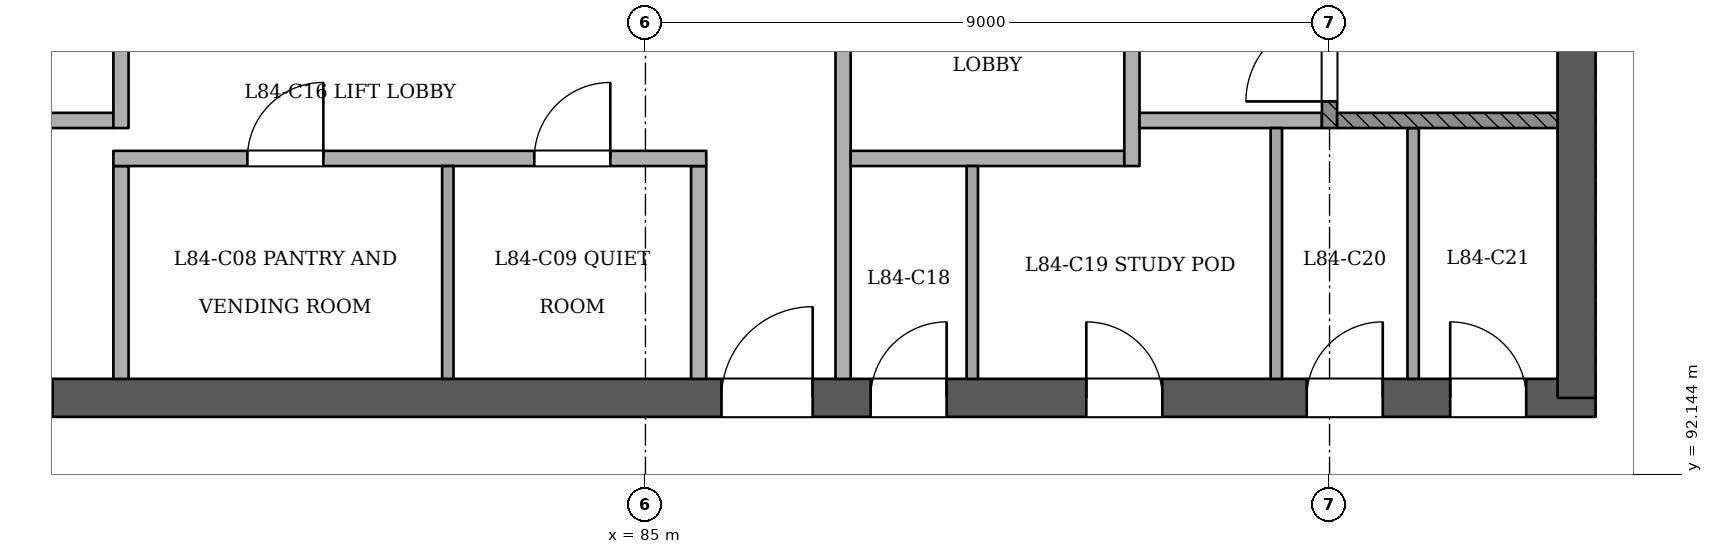
"""IFC4 building model, lengths in metres.
Left out: names, types, materials, properties, quantities, classifications, styles, units other than length and angle.
Written with IfcOpenShell. Run it as: python <this file> out.ifc"""

import sys

from ifc_helpers import new_model, si_unit, direction, frame, frame_2d, origin, place, context, subcontext, project, spatial, rectangle, extrude, element, fill, save


model = new_model("IFC4")
c1 = context("Model", 3, precision=1e-05, world=origin(), true_north=direction((0.0, 1.0)))
c2 = subcontext(c1, "Body", "Model", "MODEL_VIEW")
j1 = project(units=[si_unit("LENGTHUNIT", "METRE"), si_unit("PLANEANGLEUNIT", "RADIAN")], contexts=[c1])
p1 = place(None, origin())
s1 = spatial("IfcSite", under=j1, at=p1, CompositionType="ELEMENT")
p2 = place(p1, origin())
s2 = spatial("IfcBuilding", under=s1, at=p2, CompositionType="ELEMENT")
p3 = place(p2, frame((0.0, 0.0, 323.8)))
s3 = spatial("IfcBuildingStorey", under=s2, at=p3, CompositionType="ELEMENT", Elevation=323.8)
p4 = place(p3, frame((72.75, 93.15, 0.0), z_axis=(0.0, 0.0, 1.0), x_axis=(1.0, 0.0, 0.0)))
e1 = element("IfcWall", 1, at=p4, inside=s3, PredefinedType="SHEAR", context=c2, shape_type="SweptSolid", body=[
    extrude(rectangle(XDim=24.75, YDim=0.5, at=frame_2d((12.375, 0.0))), origin(), (0.0, 0.0, 1.0), 3.6),
])
p5 = place(p4, frame((1.05, 0.0, 0.0)))
e2 = element("IfcOpeningElement", 2, at=p5, cuts=e1, PredefinedType="OPENING", context=c2, shape_type="SweptSolid", body=[
    extrude(rectangle(XDim=1.2, YDim=2.1, at=frame_2d((0.6, 1.05))), frame((0.0, 0.26, 0.0), z_axis=(0.0, -1.0, 0.0), x_axis=(1.0, 0.0, 0.0)), (0.0, 0.0, 1.0), 0.521),
])
p6 = place(p4, frame((3.25, 0.0, 0.0)))
e3 = element("IfcOpeningElement", 3, at=p6, cuts=e1, PredefinedType="OPENING", context=c2, shape_type="SweptSolid", body=[
    extrude(rectangle(XDim=1.2, YDim=2.1, at=frame_2d((0.6, 1.05))), frame((0.0, 0.26, 0.0), z_axis=(0.0, -1.0, 0.0), x_axis=(1.0, 0.0, 0.0)), (0.0, 0.0, 1.0), 0.521),
])
p7 = place(p4, frame((13.25, 0.0, 0.0)))
e4 = element("IfcOpeningElement", 4, at=p7, cuts=e1, PredefinedType="OPENING", context=c2, shape_type="SweptSolid", body=[
    extrude(rectangle(XDim=1.2, YDim=2.1, at=frame_2d((0.6, 1.05))), frame((0.0, 0.26, 0.0), z_axis=(0.0, -1.0, 0.0), x_axis=(1.0, 0.0, 0.0)), (0.0, 0.0, 1.0), 0.521),
])
p8 = place(p4, frame((15.212, 0.0, 0.0)))
e5 = element("IfcOpeningElement", 5, at=p8, cuts=e1, PredefinedType="OPENING", context=c2, shape_type="SweptSolid", body=[
    extrude(rectangle(XDim=1.0, YDim=2.1, at=frame_2d((0.5, 1.05))), frame((0.0, 0.26, 0.0), z_axis=(0.0, -1.0, 0.0), x_axis=(1.0, 0.0, 0.0)), (0.0, 0.0, 1.0), 0.521),
])
p9 = place(p4, frame((18.05, 0.0, 0.0)))
e6 = element("IfcOpeningElement", 6, at=p9, cuts=e1, PredefinedType="OPENING", context=c2, shape_type="SweptSolid", body=[
    extrude(rectangle(XDim=1.0, YDim=2.1, at=frame_2d((0.5, 1.05))), frame((0.0, 0.26, 0.0), z_axis=(0.0, -1.0, 0.0), x_axis=(1.0, 0.0, 0.0)), (0.0, 0.0, 1.0), 0.521),
])
p10 = place(p4, frame((20.95, 0.0, 0.0)))
e7 = element("IfcOpeningElement", 7, at=p10, cuts=e1, PredefinedType="OPENING", context=c2, shape_type="SweptSolid", body=[
    extrude(rectangle(XDim=1.0, YDim=2.1, at=frame_2d((0.5, 1.05))), frame((0.0, 0.26, 0.0), z_axis=(0.0, -1.0, 0.0), x_axis=(1.0, 0.0, 0.0)), (0.0, 0.0, 1.0), 0.521),
])
p11 = place(p4, frame((22.837, 0.0, 0.0)))
e8 = element("IfcOpeningElement", 8, at=p11, cuts=e1, PredefinedType="OPENING", context=c2, shape_type="SweptSolid", body=[
    extrude(rectangle(XDim=1.0, YDim=2.1, at=frame_2d((0.5, 1.05))), frame((0.0, 0.26, 0.0), z_axis=(0.0, -1.0, 0.0), x_axis=(1.0, 0.0, 0.0)), (0.0, 0.0, 1.0), 0.521),
])
p12 = place(p3, frame((97.25, 93.15, 0.0), z_axis=(0.0, 0.0, 1.0), x_axis=(0.0, 1.0, 0.0)))
e9 = element("IfcWall", 9, at=p12, inside=s3, PredefinedType="SHEAR", context=c2, shape_type="SweptSolid", body=[
    extrude(rectangle(XDim=10.75, YDim=0.5, at=frame_2d((5.375, 0.0))), origin(), (0.0, 0.0, 1.0), 3.6),
])
p13 = place(p3, frame((78.1, 93.4, 0.0), z_axis=(0.0, 0.0, 1.0), x_axis=(0.0, 1.0, 0.0)))
e10 = element("IfcWall", 10, at=p13, inside=s3, PredefinedType="PARTITIONING", context=c2, shape_type="SweptSolid", body=[
    extrude(rectangle(XDim=2.8, YDim=0.2, at=frame_2d((1.4, 0.0))), origin(), (0.0, 0.0, 1.0), 3.2),
])
p14 = place(p3, frame((82.4, 93.4, 0.0), z_axis=(0.0, 0.0, 1.0), x_axis=(0.0, 1.0, 0.0)))
e11 = element("IfcWall", 11, at=p14, inside=s3, PredefinedType="PARTITIONING", context=c2, shape_type="SweptSolid", body=[
    extrude(rectangle(XDim=2.8, YDim=0.15, at=frame_2d((1.4, 0.0))), origin(), (0.0, 0.0, 1.0), 3.2),
])
p15 = place(p3, frame((85.7, 93.4, 0.0), z_axis=(0.0, 0.0, 1.0), x_axis=(0.0, 1.0, 0.0)))
e12 = element("IfcWall", 12, at=p15, inside=s3, PredefinedType="PARTITIONING", context=c2, shape_type="SweptSolid", body=[
    extrude(rectangle(XDim=2.8, YDim=0.2, at=frame_2d((1.4, 0.0))), origin(), (0.0, 0.0, 1.0), 3.2),
])
p16 = place(p3, frame((87.6, 93.4, 0.0), z_axis=(0.0, 0.0, 1.0), x_axis=(0.0, 1.0, 0.0)))
e13 = element("IfcWall", 13, at=p16, inside=s3, PredefinedType="PARTITIONING", context=c2, shape_type="SweptSolid", body=[
    extrude(rectangle(XDim=7.0, YDim=0.2, at=frame_2d((3.5, 0.0))), origin(), (0.0, 0.0, 1.0), 3.2),
])
p17 = place(p16, frame((4.45, 0.0, 0.0)))
e14 = element("IfcOpeningElement", 14, at=p17, cuts=e13, PredefinedType="OPENING", context=c2, shape_type="SweptSolid", body=[
    extrude(rectangle(XDim=1.1, YDim=2.1, at=frame_2d((0.55, 1.05))), frame((0.0, 0.11, 0.0), z_axis=(0.0, -1.0, 0.0), x_axis=(1.0, 0.0, 0.0)), (0.0, 0.0, 1.0), 0.221),
])
p18 = place(p3, frame((89.3, 93.4, 0.0), z_axis=(0.0, 0.0, 1.0), x_axis=(0.0, 1.0, 0.0)))
e15 = element("IfcWall", 15, at=p18, inside=s3, PredefinedType="PARTITIONING", context=c2, shape_type="SweptSolid", body=[
    extrude(rectangle(XDim=2.8, YDim=0.15, at=frame_2d((1.4, 0.0))), origin(), (0.0, 0.0, 1.0), 3.2),
])
for number, where, z_axis, x_axis in (
    (16, (93.3, 93.4, 0.0), (0.0, 0.0, 1.0), (0.0, 1.0, 0.0)),
    (17, (95.1, 93.4, 0.0), (0.0, 0.0, 1.0), (0.0, 1.0, 0.0)),
):
    element("IfcWall", number, at=place(p3, frame(where, z_axis=z_axis, x_axis=x_axis)), inside=s3, PredefinedType="PARTITIONING", context=c2, shape_type="SweptSolid", body=[
        extrude(rectangle(XDim=3.3, YDim=0.15, at=frame_2d((1.65, 0.0))), origin(), (0.0, 0.0, 1.0), 3.2),
    ])
p19 = place(p3, frame((78.0, 96.3, 0.0), z_axis=(0.0, 0.0, 1.0), x_axis=(1.0, 0.0, 0.0)))
e18 = element("IfcWall", 18, at=p19, inside=s3, PredefinedType="PARTITIONING", context=c2, shape_type="SweptSolid", body=[
    extrude(rectangle(XDim=7.8, YDim=0.2, at=frame_2d((3.9, 0.0))), origin(), (0.0, 0.0, 1.0), 3.2),
])
p20 = place(p19, frame((1.762, 0.0, 0.0)))
e19 = element("IfcOpeningElement", 19, at=p20, cuts=e18, PredefinedType="OPENING", context=c2, shape_type="SweptSolid", body=[
    extrude(rectangle(XDim=1.0, YDim=2.1, at=frame_2d((0.5, 1.05))), frame((0.0, 0.11, 0.0), z_axis=(0.0, -1.0, 0.0), x_axis=(1.0, 0.0, 0.0)), (0.0, 0.0, 1.0), 0.221),
])
p21 = place(p19, frame((5.538, 0.0, 0.0)))
e20 = element("IfcOpeningElement", 20, at=p21, cuts=e18, PredefinedType="OPENING", context=c2, shape_type="SweptSolid", body=[
    extrude(rectangle(XDim=1.0, YDim=2.1, at=frame_2d((0.5, 1.05))), frame((0.0, 0.11, 0.0), z_axis=(0.0, -1.0, 0.0), x_axis=(1.0, 0.0, 0.0)), (0.0, 0.0, 1.0), 0.221),
])
p22 = place(p3, frame((87.7, 96.3, 0.0), z_axis=(0.0, 0.0, 1.0), x_axis=(1.0, 0.0, 0.0)))
e21 = element("IfcWall", 21, at=p22, inside=s3, PredefinedType="PARTITIONING", context=c2, shape_type="SweptSolid", body=[
    extrude(rectangle(XDim=3.6, YDim=0.2, at=frame_2d((1.8, 0.0))), origin(), (0.0, 0.0, 1.0), 3.2),
])
p23 = place(p3, frame((91.4, 96.2, 0.0), z_axis=(0.0, 0.0, 1.0), x_axis=(0.0, 1.0, 0.0)))
e22 = element("IfcWall", 22, at=p23, inside=s3, PredefinedType="PARTITIONING", context=c2, shape_type="SweptSolid", body=[
    extrude(rectangle(XDim=4.2, YDim=0.2, at=frame_2d((2.1, 0.0))), origin(), (0.0, 0.0, 1.0), 3.2),
])
p24 = place(p23, frame((2.45, 0.0, 0.0)))
e23 = element("IfcOpeningElement", 23, at=p24, cuts=e22, PredefinedType="OPENING", context=c2, shape_type="SweptSolid", body=[
    extrude(rectangle(XDim=1.1, YDim=2.1, at=frame_2d((0.55, 1.05))), frame((0.0, 0.11, 0.0), z_axis=(0.0, -1.0, 0.0), x_axis=(1.0, 0.0, 0.0)), (0.0, 0.0, 1.0), 0.221),
])
p25 = place(p3, frame((76.1, 96.8, 0.0), z_axis=(0.0, 0.0, 1.0), x_axis=(1.0, 0.0, 0.0)))
e24 = element("IfcWall", 24, at=p25, inside=s3, PredefinedType="PARTITIONING", context=c2, shape_type="SweptSolid", body=[
    extrude(rectangle(XDim=1.9, YDim=0.2, at=frame_2d((0.95, 0.0))), origin(), (0.0, 0.0, 1.0), 3.2),
])
p26 = place(p3, frame((78.1, 96.7, 0.0), z_axis=(0.0, 0.0, 1.0), x_axis=(0.0, 1.0, 0.0)))
e25 = element("IfcWall", 25, at=p26, inside=s3, PredefinedType="PARTITIONING", context=c2, shape_type="SweptSolid", body=[
    extrude(rectangle(XDim=3.7, YDim=0.2, at=frame_2d((1.85, 0.0))), origin(), (0.0, 0.0, 1.0), 3.2),
])
p27 = place(p26, frame((1.95, 0.0, 0.0)))
e26 = element("IfcOpeningElement", 26, at=p27, cuts=e25, PredefinedType="OPENING", context=c2, shape_type="SweptSolid", body=[
    extrude(rectangle(XDim=1.1, YDim=2.1, at=frame_2d((0.55, 1.05))), frame((0.0, 0.11, 0.0), z_axis=(0.0, -1.0, 0.0), x_axis=(1.0, 0.0, 0.0)), (0.0, 0.0, 1.0), 0.221),
])
p28 = place(p3, frame((91.5, 96.8, 0.0), z_axis=(0.0, 0.0, 1.0), x_axis=(1.0, 0.0, 0.0)))
e27 = element("IfcWall", 27, at=p28, inside=s3, PredefinedType="PARTITIONING", context=c2, shape_type="SweptSolid", body=[
    extrude(rectangle(XDim=2.4, YDim=0.2, at=frame_2d((1.2, 0.0))), origin(), (0.0, 0.0, 1.0), 3.2),
])
p29 = place(p3, frame((94.0, 96.7, 0.0), z_axis=(0.0, 0.0, 1.0), x_axis=(0.0, 1.0, 0.0)))
e28 = element("IfcWall", 28, at=p29, inside=s3, PredefinedType="SOLIDWALL", context=c2, shape_type="SweptSolid", body=[
    extrude(rectangle(XDim=3.7, YDim=0.2, at=frame_2d((1.85, 0.0))), origin(), (0.0, 0.0, 1.0), 3.2),
])
p30 = place(p29, frame((0.35, 0.0, 0.0)))
e29 = element("IfcOpeningElement", 29, at=p30, cuts=e28, PredefinedType="OPENING", context=c2, shape_type="SweptSolid", body=[
    extrude(rectangle(XDim=1.1, YDim=2.1, at=frame_2d((0.55, 1.05))), frame((0.0, 0.11, 0.0), z_axis=(0.0, -1.0, 0.0), x_axis=(1.0, 0.0, 0.0)), (0.0, 0.0, 1.0), 0.221),
])
p31 = place(p3, frame((94.1, 96.8, 0.0), z_axis=(0.0, 0.0, 1.0), x_axis=(1.0, 0.0, 0.0)))
e30 = element("IfcWall", 30, at=p31, inside=s3, PredefinedType="SOLIDWALL", context=c2, shape_type="SweptSolid", body=[
    extrude(rectangle(XDim=2.9, YDim=0.2, at=frame_2d((1.45, 0.0))), origin(), (0.0, 0.0, 1.0), 3.2),
])
p32 = place(p30, origin())
e31 = element("IfcDoor", 31, at=p32, inside=s3, OperationType="SINGLE_SWING_LEFT", PredefinedType="NOTDEFINED", context=c2, shape_type="SweptSolid", body=[
    extrude(rectangle(XDim=1.1, YDim=2.1, at=frame_2d((0.55, 1.05))), frame((0.0, 0.025, 0.0), z_axis=(0.0, -1.0, 0.0), x_axis=(1.0, 0.0, 0.0)), (0.0, 0.0, 1.0), 0.05),
])
fill(e29, e31)
p33 = place(p6, origin())
e32 = element("IfcDoor", 32, at=p33, inside=s3, OperationType="SINGLE_SWING_LEFT", PredefinedType="NOTDEFINED", context=c2, shape_type="SweptSolid", body=[
    extrude(rectangle(XDim=1.2, YDim=2.1, at=frame_2d((0.6, 1.05))), frame((0.0, 0.025, 0.0), z_axis=(0.0, -1.0, 0.0), x_axis=(1.0, 0.0, 0.0)), (0.0, 0.0, 1.0), 0.05),
])
fill(e3, e32)
p34 = place(p7, origin())
e33 = element("IfcDoor", 33, at=p34, inside=s3, OperationType="SINGLE_SWING_RIGHT", PredefinedType="NOTDEFINED", context=c2, shape_type="SweptSolid", body=[
    extrude(rectangle(XDim=1.2, YDim=2.1, at=frame_2d((0.6, 1.05))), frame((0.0, 0.025, 0.0), z_axis=(0.0, -1.0, 0.0), x_axis=(1.0, 0.0, 0.0)), (0.0, 0.0, 1.0), 0.05),
])
fill(e4, e33)
p35 = place(p8, origin())
e34 = element("IfcDoor", 34, at=p35, inside=s3, OperationType="SINGLE_SWING_RIGHT", PredefinedType="NOTDEFINED", context=c2, shape_type="SweptSolid", body=[
    extrude(rectangle(XDim=1.0, YDim=2.1, at=frame_2d((0.5, 1.05))), frame((0.0, 0.025, 0.0), z_axis=(0.0, -1.0, 0.0), x_axis=(1.0, 0.0, 0.0)), (0.0, 0.0, 1.0), 0.05),
])
fill(e5, e34)
p36 = place(p9, origin())
e35 = element("IfcDoor", 35, at=p36, inside=s3, OperationType="SINGLE_SWING_LEFT", PredefinedType="NOTDEFINED", context=c2, shape_type="SweptSolid", body=[
    extrude(rectangle(XDim=1.0, YDim=2.1, at=frame_2d((0.5, 1.05))), frame((0.0, 0.025, 0.0), z_axis=(0.0, -1.0, 0.0), x_axis=(1.0, 0.0, 0.0)), (0.0, 0.0, 1.0), 0.05),
])
fill(e6, e35)
p37 = place(p10, origin())
e36 = element("IfcDoor", 36, at=p37, inside=s3, OperationType="SINGLE_SWING_RIGHT", PredefinedType="NOTDEFINED", context=c2, shape_type="SweptSolid", body=[
    extrude(rectangle(XDim=1.0, YDim=2.1, at=frame_2d((0.5, 1.05))), frame((0.0, 0.025, 0.0), z_axis=(0.0, -1.0, 0.0), x_axis=(1.0, 0.0, 0.0)), (0.0, 0.0, 1.0), 0.05),
])
fill(e7, e36)
p38 = place(p11, origin())
e37 = element("IfcDoor", 37, at=p38, inside=s3, OperationType="SINGLE_SWING_LEFT", PredefinedType="NOTDEFINED", context=c2, shape_type="SweptSolid", body=[
    extrude(rectangle(XDim=1.0, YDim=2.1, at=frame_2d((0.5, 1.05))), frame((0.0, 0.025, 0.0), z_axis=(0.0, -1.0, 0.0), x_axis=(1.0, 0.0, 0.0)), (0.0, 0.0, 1.0), 0.05),
])
fill(e8, e37)
p39 = place(p20, origin())
e38 = element("IfcDoor", 38, at=p39, inside=s3, OperationType="SINGLE_SWING_RIGHT", PredefinedType="NOTDEFINED", context=c2, shape_type="SweptSolid", body=[
    extrude(rectangle(XDim=1.0, YDim=2.1, at=frame_2d((0.5, 1.05))), frame((0.0, 0.025, 0.0), z_axis=(0.0, -1.0, 0.0), x_axis=(1.0, 0.0, 0.0)), (0.0, 0.0, 1.0), 0.05),
])
fill(e19, e38)
p40 = place(p21, origin())
e39 = element("IfcDoor", 39, at=p40, inside=s3, OperationType="SINGLE_SWING_RIGHT", PredefinedType="NOTDEFINED", context=c2, shape_type="SweptSolid", body=[
    extrude(rectangle(XDim=1.0, YDim=2.1, at=frame_2d((0.5, 1.05))), frame((0.0, 0.025, 0.0), z_axis=(0.0, -1.0, 0.0), x_axis=(1.0, 0.0, 0.0)), (0.0, 0.0, 1.0), 0.05),
])
fill(e20, e39)
save(model, sys.argv[1])
